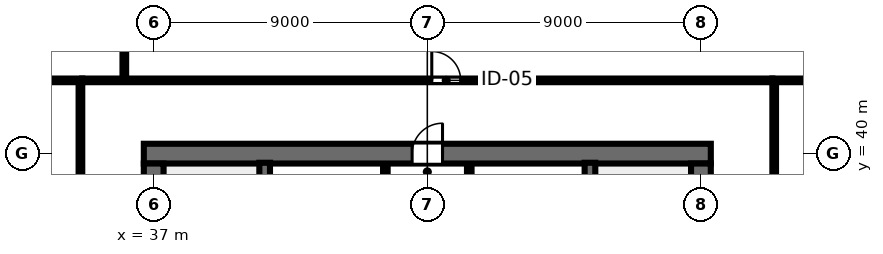
"""IFC4 building model, lengths in metres.
Left out: names, types, materials, properties, quantities, classifications, styles, units other than length and angle.
Written with IfcOpenShell. Run it as: python <this file> out.ifc"""

import sys

from ifc_helpers import new_model, si_unit, direction, frame, frame_2d, origin, place, context, subcontext, project, spatial, rectangle, extrude, element, fill, save


model = new_model("IFC4")
c1 = context("Model", 3, precision=1e-05, world=origin(), true_north=direction((0.0, 1.0)))
c2 = subcontext(c1, "Body", "Model", "MODEL_VIEW")
j1 = project(units=[si_unit("LENGTHUNIT", "METRE"), si_unit("PLANEANGLEUNIT", "RADIAN")], contexts=[c1])
p1 = place(None, origin())
s1 = spatial("IfcSite", under=j1, at=p1, CompositionType="ELEMENT")
p2 = place(p1, origin())
s2 = spatial("IfcBuilding", under=s1, at=p2, CompositionType="ELEMENT")
p3 = place(p2, frame((0.0, 0.0, 5.0)))
s3 = spatial("IfcBuildingStorey", under=s2, at=p3, CompositionType="ELEMENT", Elevation=5.0)
p4 = place(p3, frame((36.675, 40.0, 0.0), z_axis=(0.0, 0.0, 1.0), x_axis=(1.0, 0.0, 0.0)))
e1 = element("IfcWall", 1, at=p4, inside=s3, PredefinedType="SHEAR", context=c2, shape_type="SweptSolid", body=[
    extrude(rectangle(XDim=18.65, YDim=0.65, at=frame_2d((9.325, 0.0))), origin(), (0.0, 0.0, 1.0), 4.22),
])
p5 = place(p4, frame((8.825, 0.0, 0.0)))
e2 = element("IfcOpeningElement", 2, at=p5, cuts=e1, PredefinedType="OPENING", context=c2, shape_type="SweptSolid", body=[
    extrude(rectangle(XDim=1.0, YDim=2.15, at=frame_2d((0.5, 1.075))), frame((0.0, 0.335, 0.0), z_axis=(0.0, -1.0, 0.0), x_axis=(1.0, 0.0, 0.0)), (0.0, 0.0, 1.0), 0.67),
])
p6 = place(p3, frame((37.0, 24.325, 0.0), z_axis=(0.0, 0.0, 1.0), x_axis=(0.0, 1.0, 0.0)))
e3 = element("IfcWall", 3, at=p6, inside=s3, PredefinedType="SHEAR", context=c2, shape_type="SweptSolid", body=[
    extrude(rectangle(XDim=15.35, YDim=0.65, at=frame_2d((7.675, 0.0))), origin(), (0.0, 0.0, 1.0), 4.22),
])
p7 = place(p6, frame((5.2, 0.0, 0.0)))
e4 = element("IfcOpeningElement", 4, at=p7, cuts=e3, PredefinedType="OPENING", context=c2, shape_type="SweptSolid", body=[
    extrude(rectangle(XDim=1.15, YDim=2.15, at=frame_2d((0.575, 1.075))), frame((0.0, 0.335, 0.0), z_axis=(0.0, -1.0, 0.0), x_axis=(1.0, 0.0, 0.0)), (0.0, 0.0, 1.0), 0.67),
])
p8 = place(p3, frame((55.0, 24.325, 0.0), z_axis=(0.0, 0.0, 1.0), x_axis=(0.0, 1.0, 0.0)))
e5 = element("IfcWall", 5, at=p8, inside=s3, PredefinedType="SHEAR", context=c2, shape_type="SweptSolid", body=[
    extrude(rectangle(XDim=15.35, YDim=0.65, at=frame_2d((7.675, 0.0))), origin(), (0.0, 0.0, 1.0), 4.22),
])
p9 = place(p8, frame((5.2, 0.0, 0.0)))
e6 = element("IfcOpeningElement", 6, at=p9, cuts=e5, PredefinedType="OPENING", context=c2, shape_type="SweptSolid", body=[
    extrude(rectangle(XDim=1.15, YDim=2.15, at=frame_2d((0.575, 1.075))), frame((0.0, 0.335, 0.0), z_axis=(0.0, -1.0, 0.0), x_axis=(1.0, 0.0, 0.0)), (0.0, 0.0, 1.0), 0.67),
])
for number, where, z_axis, x_axis in (
    (7, (40.65, 32.0, 0.0), (0.0, 0.0, 1.0), (0.0, 1.0, 0.0)),
    (8, (51.35, 32.0, 0.0), (0.0, 0.0, 1.0), (0.0, 1.0, 0.0)),
):
    element("IfcWall", number, at=place(p3, frame(where, z_axis=z_axis, x_axis=x_axis)), inside=s3, PredefinedType="SHEAR", context=c2, shape_type="SweptSolid", body=[
        extrude(rectangle(XDim=7.7, YDim=0.35, at=frame_2d((3.85, 0.0))), origin(), (0.0, 0.0, 1.0), 4.5),
    ])
p10 = place(p3, frame((44.62, 35.72, 0.0), z_axis=(0.0, 0.0, 1.0), x_axis=(0.0, 1.0, 0.0)))
e9 = element("IfcWall", 9, at=p10, inside=s3, PredefinedType="PARTITIONING", context=c2, shape_type="SweptSolid", body=[
    extrude(rectangle(XDim=3.93, YDim=0.15, at=frame_2d((1.965, 0.0))), origin(), (0.0, 0.0, 1.0), 4.22),
])
p11 = place(p10, frame((1.5, 0.0, 0.0)))
e10 = element("IfcOpeningElement", 10, at=p11, cuts=e9, PredefinedType="OPENING", context=c2, shape_type="SweptSolid", body=[
    extrude(rectangle(XDim=0.9, YDim=2.15, at=frame_2d((0.45, 1.075))), frame((0.0, 0.085, 0.0), z_axis=(0.0, -1.0, 0.0), x_axis=(1.0, 0.0, 0.0)), (0.0, 0.0, 1.0), 0.17),
])
p12 = place(p3, frame((47.38, 35.72, 0.0), z_axis=(0.0, 0.0, 1.0), x_axis=(0.0, 1.0, 0.0)))
e11 = element("IfcWall", 11, at=p12, inside=s3, PredefinedType="PARTITIONING", context=c2, shape_type="SweptSolid", body=[
    extrude(rectangle(XDim=3.93, YDim=0.15, at=frame_2d((1.965, 0.0))), origin(), (0.0, 0.0, 1.0), 4.22),
])
p13 = place(p12, frame((1.5, 0.0, 0.0)))
e12 = element("IfcOpeningElement", 12, at=p13, cuts=e11, PredefinedType="OPENING", context=c2, shape_type="SweptSolid", body=[
    extrude(rectangle(XDim=0.9, YDim=2.15, at=frame_2d((0.45, 1.075))), frame((0.0, 0.085, 0.0), z_axis=(0.0, -1.0, 0.0), x_axis=(1.0, 0.0, 0.0)), (0.0, 0.0, 1.0), 0.17),
])
p14 = place(p3, frame((36.034, 42.41, 0.0), z_axis=(0.0, 0.0, 1.0), x_axis=(0.0, 1.0, 0.0)))
e13 = element("IfcWall", 13, at=p14, inside=s3, PredefinedType="PARTITIONING", context=c2, shape_type="SweptSolid", body=[
    extrude(rectangle(XDim=17.25, YDim=0.12, at=frame_2d((8.625, 0.0))), origin(), (0.0, 0.0, 1.0), 3.32),
])
p15 = place(p14, frame((1.4, 0.0, 0.0)))
e14 = element("IfcOpeningElement", 14, at=p15, cuts=e13, PredefinedType="OPENING", context=c2, shape_type="SweptSolid", body=[
    extrude(rectangle(XDim=0.9, YDim=2.15, at=frame_2d((0.45, 1.075))), frame((0.0, 0.07, 0.0), z_axis=(0.0, -1.0, 0.0), x_axis=(1.0, 0.0, 0.0)), (0.0, 0.0, 1.0), 0.14),
])
p16 = place(p3, frame((34.65, 42.41, 0.0), z_axis=(0.0, 0.0, 1.0), x_axis=(1.0, 0.0, 0.0)))
e15 = element("IfcWall", 15, at=p16, inside=s3, PredefinedType="PARTITIONING", context=c2, shape_type="SweptSolid", body=[
    extrude(rectangle(XDim=22.7, YDim=0.12, at=frame_2d((11.35, 0.0))), origin(), (0.0, 0.0, 1.0), 3.32),
])
p17 = place(p16, frame((11.497, 0.0, 0.0)))
e16 = element("IfcOpeningElement", 16, at=p17, cuts=e15, PredefinedType="OPENING", context=c2, shape_type="SweptSolid", body=[
    extrude(rectangle(XDim=0.95, YDim=2.15, at=frame_2d((0.475, 1.075))), frame((0.0, 0.07, 0.0), z_axis=(0.0, -1.0, 0.0), x_axis=(1.0, 0.0, 0.0)), (0.0, 0.0, 1.0), 0.14),
])
p18 = place(p3, frame((34.59, 21.65, 0.0), z_axis=(0.0, 0.0, 1.0), x_axis=(0.0, 1.0, 0.0)))
e17 = element("IfcWall", 17, at=p18, inside=s3, PredefinedType="PARTITIONING", context=c2, shape_type="SweptSolid", body=[
    extrude(rectangle(XDim=20.7, YDim=0.12, at=frame_2d((10.35, 0.0))), origin(), (0.0, 0.0, 1.0), 3.32),
])
p19 = place(p18, frame((9.875, 0.0, 0.0)))
e18 = element("IfcOpeningElement", 18, at=p19, cuts=e17, PredefinedType="OPENING", context=c2, shape_type="SweptSolid", body=[
    extrude(rectangle(XDim=0.95, YDim=2.15, at=frame_2d((0.475, 1.075))), frame((0.0, 0.07, 0.0), z_axis=(0.0, -1.0, 0.0), x_axis=(1.0, 0.0, 0.0)), (0.0, 0.0, 1.0), 0.14),
])
p20 = place(p3, frame((57.41, 21.65, 0.0), z_axis=(0.0, 0.0, 1.0), x_axis=(0.0, 1.0, 0.0)))
e19 = element("IfcWall", 19, at=p20, inside=s3, PredefinedType="PARTITIONING", context=c2, shape_type="SweptSolid", body=[
    extrude(rectangle(XDim=20.7, YDim=0.12, at=frame_2d((10.35, 0.0))), origin(), (0.0, 0.0, 1.0), 3.32),
])
p21 = place(p20, frame((9.875, 0.0, 0.0)))
e20 = element("IfcOpeningElement", 20, at=p21, cuts=e19, PredefinedType="OPENING", context=c2, shape_type="SweptSolid", body=[
    extrude(rectangle(XDim=0.95, YDim=2.15, at=frame_2d((0.475, 1.075))), frame((0.0, 0.07, 0.0), z_axis=(0.0, -1.0, 0.0), x_axis=(1.0, 0.0, 0.0)), (0.0, 0.0, 1.0), 0.14),
])
for number, where, z_axis, x_axis in (
    (21, (34.65, 42.41, 0.0), (0.0, 0.0, 1.0), (-1.0, 0.0, 0.0)),
    (22, (57.35, 42.41, 0.0), (0.0, 0.0, 1.0), (1.0, 0.0, 0.0)),
):
    element("IfcWall", number, at=place(p3, frame(where, z_axis=z_axis, x_axis=x_axis)), inside=s3, PredefinedType="PARTITIONING", context=c2, shape_type="SweptSolid", body=[
        extrude(rectangle(XDim=29.01, YDim=0.12, at=frame_2d((14.505, 0.0))), origin(), (0.0, 0.0, 1.0), 3.32),
    ])
p22 = place(p5, origin())
e23 = element("IfcDoor", 23, at=p22, inside=s3, OperationType="SINGLE_SWING_RIGHT", PredefinedType="DOOR", context=c2, shape_type="SweptSolid", body=[
    extrude(rectangle(XDim=1.0, YDim=2.15, at=frame_2d((0.5, 1.075))), frame((0.0, 0.025, 0.0), z_axis=(0.0, -1.0, 0.0), x_axis=(1.0, 0.0, 0.0)), (0.0, 0.0, 1.0), 0.05),
])
fill(e2, e23)
p23 = place(p17, origin())
e24 = element("IfcDoor", 24, at=p23, inside=s3, OperationType="SINGLE_SWING_LEFT", PredefinedType="DOOR", context=c2, shape_type="SweptSolid", body=[
    extrude(rectangle(XDim=0.95, YDim=2.15, at=frame_2d((0.475, 1.075))), frame((0.0, 0.025, 0.0), z_axis=(0.0, -1.0, 0.0), x_axis=(1.0, 0.0, 0.0)), (0.0, 0.0, 1.0), 0.05),
])
fill(e16, e24)
save(model, sys.argv[1])
